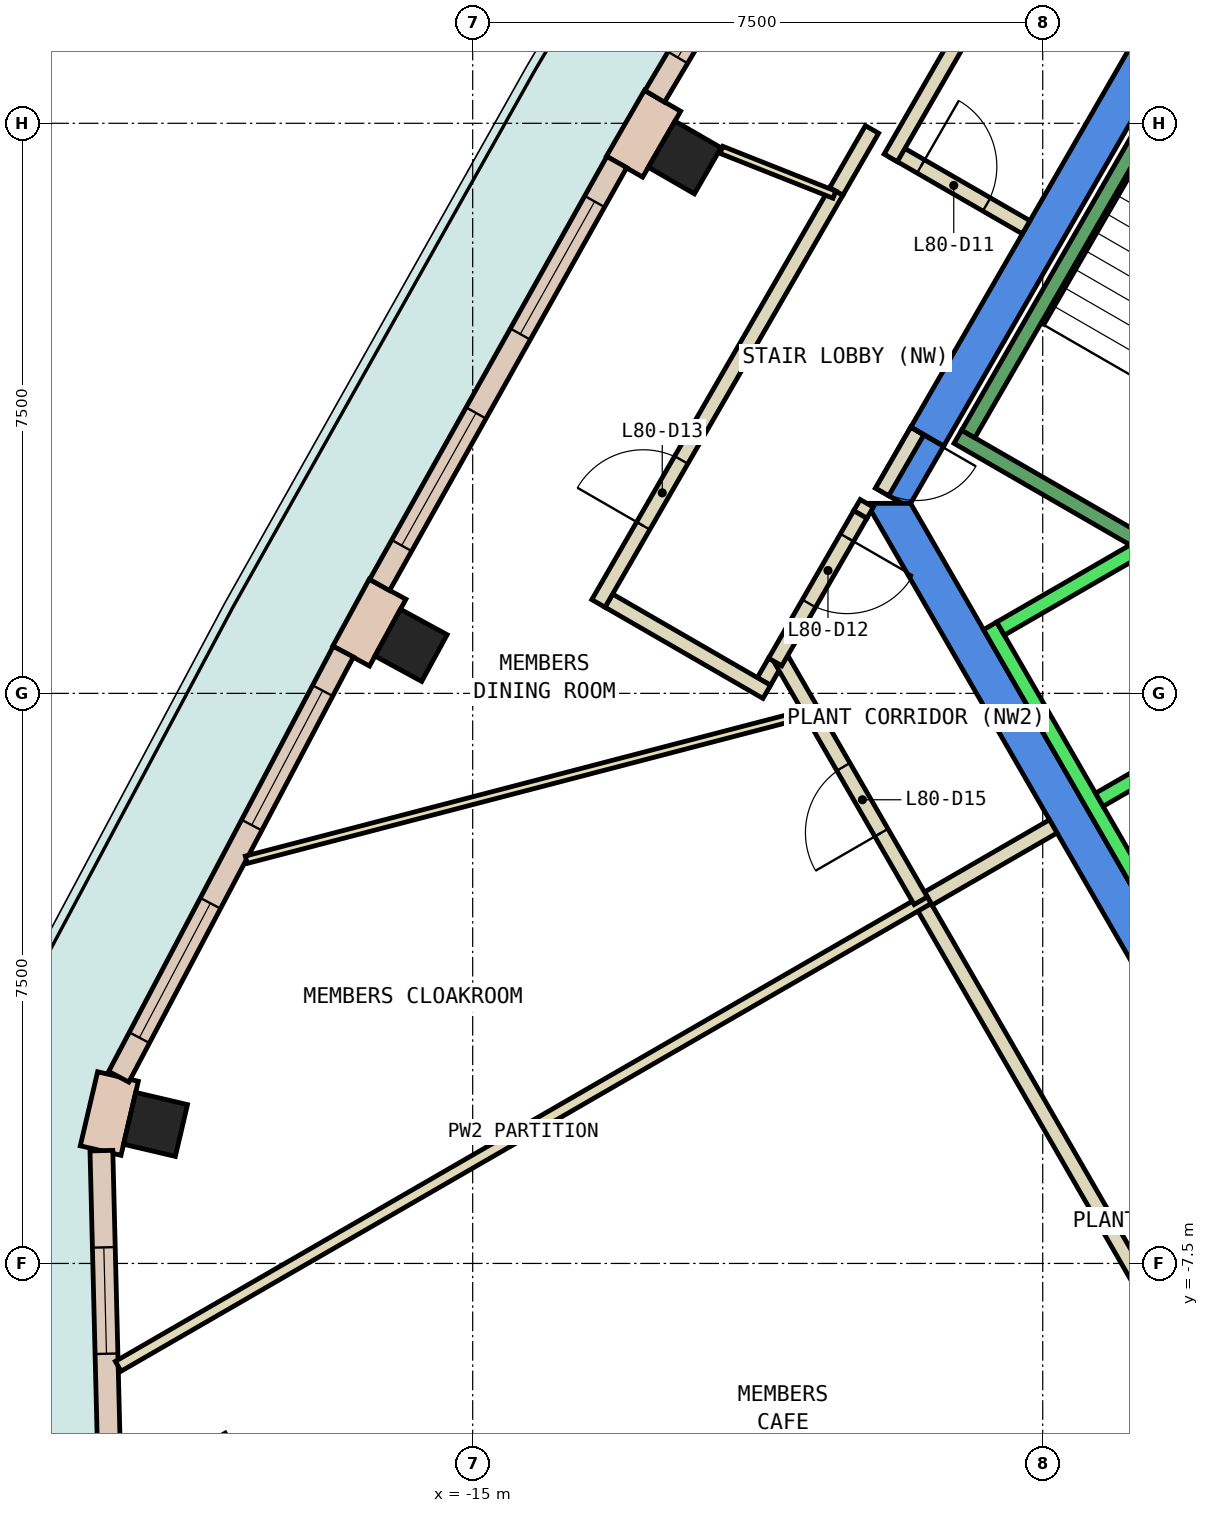
"""IFC4 building model, lengths in metres.
Left out: names, types, materials, properties, quantities, classifications, styles, units other than length and angle.
Written with IfcOpenShell. Run it as: python <this file> out.ifc"""

import sys

from ifc_helpers import new_model, si_unit, direction, frame, frame_2d, origin, origin_2d, place, context, subcontext, project, spatial, polyline, rectangle, outline, extrude, element, fill, save


model = new_model("IFC4")
c1 = context("Model", 3, precision=1e-05, world=origin(), true_north=direction((0.0, 1.0)))
c2 = subcontext(c1, "Body", "Model", "MODEL_VIEW")
j1 = project(units=[si_unit("LENGTHUNIT", "METRE"), si_unit("PLANEANGLEUNIT", "RADIAN")], contexts=[c1])
p1 = place(None, origin())
s1 = spatial("IfcSite", under=j1, at=p1, CompositionType="ELEMENT")
p2 = place(p1, origin())
s2 = spatial("IfcBuilding", under=s1, at=p2, CompositionType="ELEMENT")
p3 = place(p2, frame((0.0, 0.0, 340.4)))
s3 = spatial("IfcBuildingStorey", under=s2, at=p3, CompositionType="ELEMENT", Elevation=340.4)
for number, where, z_axis, x_axis in (
    (1, (-12.211, 7.05, 0.0), (0.0, 0.0, 1.0), (0.5, 0.866, 0.0)),
    (2, (-15.811, 0.632, 0.0), (0.0, 0.0, 1.0), (0.478, 0.878, 0.0)),
    (3, (-19.173, -5.671, 0.0), (0.0, 0.0, 1.0), (0.228, 0.974, 0.0)),
):
    element("IfcColumn", number, at=place(p3, frame(where, z_axis=z_axis, x_axis=x_axis)), inside=s3, PredefinedType="COLUMN", context=c2, shape_type="SweptSolid", body=[
        extrude(rectangle(XDim=0.7, YDim=0.7, at=origin_2d()), origin(), (0.0, 0.0, 1.0), 4.15),
    ])
p4 = place(p3, frame((-18.512, -10.688, 0.0), z_axis=(0.0, 0.0, 1.0), x_axis=(0.866025403784, 0.5, 0.0)))
e4 = element("IfcColumn", 4, at=p4, inside=s3, PredefinedType="COLUMN", context=c2, shape_type="SweptSolid", body=[
    extrude(rectangle(XDim=1.4, YDim=1.4, at=origin_2d()), origin(), (0.0, 0.0, 1.0), 4.15),
])
p5 = place(p3, frame((0.0, 0.0, -0.45)))
e5 = element("IfcWall", 5, at=p5, inside=s3, PredefinedType="SHEAR", context=c2, shape_type="SweptSolid", body=[
    extrude(outline(polyline([(-9.236, 3.502), (-8.803, 3.253), (-4.619, 10.5), (-4.907, 11.0), (-9.236, 3.502)])), origin(), (0.0, 0.0, 1.0), 4.6),
])
p6 = place(p3, frame((0.0, 0.0, 3.6)))
e6 = element("IfcWall", 6, at=p6, inside=s3, PredefinedType="SHEAR", context=c2, shape_type="SweptSolid", body=[
    extrude(outline(polyline([(-9.7, 2.7), (-9.354, 2.5), (-9.238, 2.5), (-8.803, 3.253), (-9.236, 3.502), (-9.7, 2.7)])), origin(), (0.0, 0.0, 1.0), 0.55),
])
p7 = place(p3, frame((0.0, 0.0, -0.45)))
e7 = element("IfcWall", 7, at=p7, inside=s3, PredefinedType="SHEAR", context=c2, shape_type="SweptSolid", body=[
    extrude(outline(polyline([(-9.815, 2.5), (-4.907, -6.0), (-4.619, -5.5), (-9.238, 2.5), (-9.815, 2.5)])), origin(), (0.0, 0.0, 1.0), 4.6),
])
p8 = place(p3, frame((-12.502, 7.796, 0.0), z_axis=(0.0, 0.0, 1.0), x_axis=(-0.49960277677, -0.866254619292, 0.0)))
e8 = element("IfcWall", 8, at=p8, inside=s3, PredefinedType="STANDARD", context=c2, shape_type="SweptSolid", body=[
    extrude(rectangle(XDim=1.001, YDim=0.55, at=frame_2d((0.5, 0.0))), origin(), (0.0, 0.0, 1.0), 4.15),
])
p9 = place(p3, frame((-16.12, 1.37, 0.0), z_axis=(0.0, 0.0, 1.0), x_axis=(-0.478442030542, -0.878119139645, 0.0)))
e9 = element("IfcWall", 9, at=p9, inside=s3, PredefinedType="STANDARD", context=c2, shape_type="SweptSolid", body=[
    extrude(rectangle(XDim=1.001, YDim=0.55, at=frame_2d((0.5, 0.0))), origin(), (0.0, 0.0, 1.0), 4.15),
])
p10 = place(p3, frame((-19.667, -5.041, 0.0), z_axis=(0.0, 0.0, 1.0), x_axis=(-0.227978015861, -0.97366627973, 0.0)))
e10 = element("IfcWall", 10, at=p10, inside=s3, PredefinedType="STANDARD", context=c2, shape_type="SweptSolid", body=[
    extrude(rectangle(XDim=1.0, YDim=0.55, at=frame_2d((0.5, 0.0))), origin(), (0.0, 0.0, 1.0), 4.15),
])
p11 = place(p3, frame((-9.347, 13.339, 0.0), z_axis=(0.0, 0.0, 1.0), x_axis=(-0.510686403068, -0.859767060152, 0.0)))
e11 = element("IfcWall", 11, at=p11, inside=s3, PredefinedType="STANDARD", context=c2, shape_type="SweptSolid", body=[
    extrude(rectangle(XDim=6.38, YDim=0.3, at=frame_2d((3.19, 0.0))), origin(), (0.0, 0.0, 1.0), 4.15),
])
p12 = place(p11, frame((0.595, 0.0, 0.0)))
e12 = element("IfcOpeningElement", 12, at=p12, cuts=e11, PredefinedType="OPENING", context=c2, shape_type="SweptSolid", body=[
    extrude(rectangle(XDim=2.0, YDim=2.4, at=frame_2d((1.0, 1.2))), frame((0.0, 0.16, 0.0), z_axis=(0.0, -1.0, 0.0), x_axis=(1.0, 0.0, 0.0)), (0.0, 0.0, 1.0), 0.32),
])
p13 = place(p11, frame((3.785, 0.0, 0.9)))
e13 = element("IfcOpeningElement", 13, at=p13, cuts=e11, PredefinedType="OPENING", context=c2, shape_type="SweptSolid", body=[
    extrude(rectangle(XDim=2.0, YDim=3.0, at=frame_2d((1.0, 1.5))), frame((0.0, 0.16, 0.0), z_axis=(0.0, -1.0, 0.0), x_axis=(1.0, 0.0, 0.0)), (0.0, 0.0, 1.0), 0.32),
])
p14 = place(p3, frame((-13.104, 6.99, 0.0), z_axis=(0.0, 0.0, 1.0), x_axis=(-0.489232514948, -0.872153396094, 0.0)))
e14 = element("IfcWall", 14, at=p14, inside=s3, PredefinedType="STANDARD", context=c2, shape_type="SweptSolid", body=[
    extrude(rectangle(XDim=6.38, YDim=0.3, at=frame_2d((3.19, 0.0))), origin(), (0.0, 0.0, 1.0), 4.15),
])
p15 = place(p14, frame((0.595, 0.0, 0.9)))
e15 = element("IfcOpeningElement", 15, at=p15, cuts=e14, PredefinedType="OPENING", context=c2, shape_type="SweptSolid", body=[
    extrude(rectangle(XDim=2.0, YDim=3.0, at=frame_2d((1.0, 1.5))), frame((0.0, 0.16, 0.0), z_axis=(0.0, -1.0, 0.0), x_axis=(1.0, 0.0, 0.0)), (0.0, 0.0, 1.0), 0.32),
])
p16 = place(p14, frame((3.785, 0.0, 0.9)))
e16 = element("IfcOpeningElement", 16, at=p16, cuts=e14, PredefinedType="OPENING", context=c2, shape_type="SweptSolid", body=[
    extrude(rectangle(XDim=2.0, YDim=3.0, at=frame_2d((1.0, 1.5))), frame((0.0, 0.16, 0.0), z_axis=(0.0, -1.0, 0.0), x_axis=(1.0, 0.0, 0.0)), (0.0, 0.0, 1.0), 0.32),
])
p17 = place(p3, frame((-16.702, 0.549, 0.0), z_axis=(0.0, 0.0, 1.0), x_axis=(-0.467155191513, -0.884175337274, 0.0)))
e17 = element("IfcWall", 17, at=p17, inside=s3, PredefinedType="STANDARD", context=c2, shape_type="SweptSolid", body=[
    extrude(rectangle(XDim=6.326, YDim=0.3, at=frame_2d((3.163, 0.0))), origin(), (0.0, 0.0, 1.0), 4.15),
])
p18 = place(p17, frame((0.581, 0.0, 0.9)))
e18 = element("IfcOpeningElement", 18, at=p18, cuts=e17, PredefinedType="OPENING", context=c2, shape_type="SweptSolid", body=[
    extrude(rectangle(XDim=2.0, YDim=3.0, at=frame_2d((1.0, 1.5))), frame((0.0, 0.16, 0.0), z_axis=(0.0, -1.0, 0.0), x_axis=(1.0, 0.0, 0.0)), (0.0, 0.0, 1.0), 0.32),
])
p19 = place(p17, frame((3.744, 0.0, 0.9)))
e19 = element("IfcOpeningElement", 19, at=p19, cuts=e17, PredefinedType="OPENING", context=c2, shape_type="SweptSolid", body=[
    extrude(rectangle(XDim=2.0, YDim=3.0, at=frame_2d((1.0, 1.5))), frame((0.0, 0.16, 0.0), z_axis=(0.0, -1.0, 0.0), x_axis=(1.0, 0.0, 0.0)), (0.0, 0.0, 1.0), 0.32),
])
p20 = place(p3, frame((-19.885, -6.016, 0.0), z_axis=(0.0, 0.0, 1.0), x_axis=(0.025006167975, -0.99968729689, 0.0)))
e20 = element("IfcWall", 20, at=p20, inside=s3, PredefinedType="STANDARD", context=c2, shape_type="SweptSolid", body=[
    extrude(rectangle(XDim=4.364, YDim=0.3, at=frame_2d((2.182, 0.0))), origin(), (0.0, 0.0, 1.0), 4.15),
])
p21 = place(p20, frame((1.273, 0.0, 0.9)))
e21 = element("IfcOpeningElement", 21, at=p21, cuts=e20, PredefinedType="OPENING", context=c2, shape_type="SweptSolid", body=[
    extrude(rectangle(XDim=1.4, YDim=3.0, at=frame_2d((0.7, 1.5))), frame((0.0, 0.16, 0.0), z_axis=(0.0, -1.0, 0.0), x_axis=(1.0, 0.0, 0.0)), (0.0, 0.0, 1.0), 0.32),
])
p22 = place(p3, frame((-6.112, -7.913, 0.0), z_axis=(0.0, 0.0, 1.0), x_axis=(-0.499915430684, 0.866074224396, 0.0)))
e22 = element("IfcWall", 22, at=p22, inside=s3, PredefinedType="PARTITIONING", context=c2, shape_type="SweptSolid", body=[
    extrude(rectangle(XDim=5.987, YDim=0.2, at=frame_2d((2.993, 0.0))), origin(), (0.0, 0.0, 1.0), 4.15),
])
p23 = place(p3, frame((-9.006, -2.7, 0.0), z_axis=(0.0, 0.0, 1.0), x_axis=(0.865980106173, 0.500078449558, 0.0)))
e23 = element("IfcWall", 23, at=p23, inside=s3, PredefinedType="PARTITIONING", context=c2, shape_type="SweptSolid", body=[
    extrude(rectangle(XDim=1.9, YDim=0.2, at=frame_2d((0.95, 0.0))), origin(), (0.0, 0.0, 1.0), 4.15),
])
p24 = place(p3, frame((-19.664, -8.853, 0.0), z_axis=(0.0, 0.0, 1.0), x_axis=(0.866035935173, 0.499981758657, 0.0)))
e24 = element("IfcWall", 24, at=p24, inside=s3, PredefinedType="PARTITIONING", context=c2, shape_type="SweptSolid", body=[
    extrude(rectangle(XDim=12.307, YDim=0.15, at=frame_2d((6.153, 0.0))), origin(), (0.0, 0.0, 1.0), 4.15),
])
p25 = place(p3, frame((-9.45, 7.132, 0.0), z_axis=(0.0, 0.0, 1.0), x_axis=(0.866010750942, -0.50002537861, 0.0)))
e25 = element("IfcWall", 25, at=p25, inside=s3, PredefinedType="PARTITIONING", context=c2, shape_type="SweptSolid", body=[
    extrude(rectangle(XDim=2.0, YDim=0.2, at=frame_2d((1.0, 0.0))), origin(), (0.0, 0.0, 1.0), 4.15),
])
p26 = place(p25, frame((0.4, 0.0, 0.0)))
e26 = element("IfcOpeningElement", 26, at=p26, cuts=e25, PredefinedType="OPENING", context=c2, shape_type="SweptSolid", body=[
    extrude(rectangle(XDim=1.0, YDim=2.1, at=frame_2d((0.5, 1.05))), frame((0.0, 0.11, 0.0), z_axis=(0.0, -1.0, 0.0), x_axis=(1.0, 0.0, 0.0)), (0.0, 0.0, 1.0), 0.22),
])
p27 = place(p3, frame((-9.815, 2.5, 0.0), z_axis=(0.0, 0.0, 1.0), x_axis=(-0.5004692653, -0.865754303766, 0.0)))
e27 = element("IfcWall", 27, at=p27, inside=s3, PredefinedType="PARTITIONING", context=c2, shape_type="SweptSolid", body=[
    extrude(rectangle(XDim=0.17, YDim=0.2, at=frame_2d((0.085, 0.0))), origin(), (0.0, 0.0, 1.0), 2.4),
])
p28 = place(p3, frame((-11.02, 0.413, 0.0), z_axis=(0.0, 0.0, 1.0), x_axis=(-0.500222587251, -0.865896854829, 0.0)))
e28 = element("IfcWall", 28, at=p28, inside=s3, PredefinedType="PARTITIONING", context=c2, shape_type="SweptSolid", body=[
    extrude(rectangle(XDim=0.296, YDim=0.2, at=frame_2d((0.148, 0.0))), origin(), (0.0, 0.0, 1.0), 4.15),
])
p29 = place(p3, frame((-11.131, 0.02, 0.0), z_axis=(0.0, 0.0, 1.0), x_axis=(-0.865973769406, 0.500089422704, 0.0)))
e29 = element("IfcWall", 29, at=p29, inside=s3, PredefinedType="PARTITIONING", context=c2, shape_type="SweptSolid", body=[
    extrude(rectangle(XDim=2.399, YDim=0.2, at=frame_2d((1.2, 0.0))), origin(), (0.0, 0.0, 1.0), 4.15),
])
p30 = place(p3, frame((-13.346, 1.183, 0.0), z_axis=(0.0, 0.0, 1.0), x_axis=(0.5000150537, 0.866016712352, 0.0)))
e30 = element("IfcWall", 30, at=p30, inside=s3, PredefinedType="PARTITIONING", context=c2, shape_type="SweptSolid", body=[
    extrude(rectangle(XDim=6.26, YDim=0.2, at=frame_2d((3.13, 0.0))), origin(), (0.0, 0.0, 1.0), 4.15),
])
p31 = place(p30, frame((1.18, 0.0, 0.0)))
e31 = element("IfcOpeningElement", 31, at=p31, cuts=e30, PredefinedType="OPENING", context=c2, shape_type="SweptSolid", body=[
    extrude(rectangle(XDim=1.0, YDim=2.1, at=frame_2d((0.5, 1.05))), frame((0.0, 0.11, 0.0), z_axis=(0.0, -1.0, 0.0), x_axis=(1.0, 0.0, 0.0)), (0.0, 0.0, 1.0), 0.22),
])
p32 = place(p3, frame((-10.216, 6.604, 0.0), z_axis=(0.0, 0.0, 1.0), x_axis=(0.499572668549, 0.866271983178, 0.0)))
e32 = element("IfcWall", 32, at=p32, inside=s3, PredefinedType="PARTITIONING", context=c2, shape_type="SweptSolid", body=[
    extrude(rectangle(XDim=0.941, YDim=0.2, at=frame_2d((0.47, 0.0))), origin(), (0.0, 0.0, 1.0), 4.15),
])
p33 = place(p3, frame((-9.5, 7.045, 0.0), z_axis=(0.0, 0.0, 1.0), x_axis=(0.499966812698, 0.866044563634, 0.0)))
e33 = element("IfcWall", 33, at=p33, inside=s3, PredefinedType="PARTITIONING", context=c2, shape_type="SweptSolid", body=[
    extrude(rectangle(XDim=6.977, YDim=0.2, at=frame_2d((3.488, 0.0))), origin(), (0.0, 0.0, 1.0), 4.15),
])
p34 = place(p33, frame((5.826, 0.0, 0.0)))
e34 = element("IfcOpeningElement", 34, at=p34, cuts=e33, PredefinedType="OPENING", context=c2, shape_type="SweptSolid", body=[
    extrude(rectangle(XDim=1.0, YDim=2.1, at=frame_2d((0.5, 1.05))), frame((0.0, 0.11, 0.0), z_axis=(0.0, -1.0, 0.0), x_axis=(1.0, 0.0, 0.0)), (0.0, 0.0, 1.0), 0.22),
])
p35 = place(p3, frame((-10.563, -0.205, 0.0), z_axis=(0.0, 0.0, 1.0), x_axis=(-0.499912825186, 0.866075728337, 0.0)))
e35 = element("IfcWall", 35, at=p35, inside=s3, PredefinedType="PARTITIONING", context=c2, shape_type="SweptSolid", body=[
    extrude(rectangle(XDim=0.814, YDim=0.2, at=frame_2d((0.407, 0.0))), origin(), (0.0, 0.0, 1.0), 4.15),
])
p36 = place(p3, frame((-9.105, -2.728, 0.0), z_axis=(0.0, 0.0, 1.0), x_axis=(-0.500253029287, 0.865879267963, 0.0)))
e36 = element("IfcWall", 36, at=p36, inside=s3, PredefinedType="PARTITIONING", context=c2, shape_type="SweptSolid", body=[
    extrude(rectangle(XDim=2.814, YDim=0.2, at=frame_2d((1.407, 0.0))), origin(), (0.0, 0.0, 1.0), 4.15),
])
p37 = place(p36, frame((1.034, 0.0, 0.0)))
e37 = element("IfcOpeningElement", 37, at=p37, cuts=e36, PredefinedType="OPENING", context=c2, shape_type="SweptSolid", body=[
    extrude(rectangle(XDim=1.0, YDim=2.1, at=frame_2d((0.5, 1.05))), frame((0.0, 0.11, 0.0), z_axis=(0.0, -1.0, 0.0), x_axis=(1.0, 0.0, 0.0)), (0.0, 0.0, 1.0), 0.22),
])
p38 = place(p3, frame((-11.726, 7.15, 0.0), z_axis=(0.0, 0.0, 1.0), x_axis=(0.929589639936, -0.36859612223, 0.0)))
e38 = element("IfcWall", 38, at=p38, inside=s3, PredefinedType="PARTITIONING", context=c2, shape_type="SweptSolid", body=[
    extrude(rectangle(XDim=1.598, YDim=0.1, at=frame_2d((0.799, 0.0))), origin(), (0.0, 0.0, 1.0), 4.15),
])
p39 = place(p3, frame((-10.441, -0.223, 0.0), z_axis=(0.0, 0.0, 1.0), x_axis=(-0.967629585061, -0.252374693888, 0.0)))
e39 = element("IfcWall", 39, at=p39, inside=s3, PredefinedType="PARTITIONING", context=c2, shape_type="SweptSolid", body=[
    extrude(rectangle(XDim=7.79, YDim=0.1, at=frame_2d((3.895, 0.0))), origin(), (0.0, 0.0, 1.0), 4.15),
])
p40 = place(p3, frame((-9.15, 3.452, 0.0), z_axis=(0.0, 0.0, 1.0), x_axis=(-0.500079945886, -0.865979242085, 0.0)))
e40 = element("IfcWall", 40, at=p40, inside=s3, PredefinedType="PARTITIONING", context=c2, shape_type="SweptSolid", body=[
    extrude(rectangle(XDim=0.926, YDim=0.2, at=frame_2d((0.463, 0.0))), origin(), (0.0, 0.0, 1.0), 2.4),
])
p41 = place(p40, frame((0.017, 0.0, 0.0)))
e41 = element("IfcOpeningElement", 41, at=p41, cuts=e40, PredefinedType="OPENING", context=c2, shape_type="SweptSolid", body=[
    extrude(rectangle(XDim=0.9, YDim=2.1, at=frame_2d((0.45, 1.05))), frame((0.0, 0.11, 0.0), z_axis=(0.0, -1.0, 0.0), x_axis=(1.0, 0.0, 0.0)), (0.0, 0.0, 1.0), 0.22),
])
p42 = place(p3, frame((-9.9, 2.353, 0.0), z_axis=(0.0, 0.0, 1.0), x_axis=(-0.500030632641, -0.866007717299, 0.0)))
e42 = element("IfcWall", 42, at=p42, inside=s3, PredefinedType="PARTITIONING", context=c2, shape_type="SweptSolid", body=[
    extrude(rectangle(XDim=2.24, YDim=0.2, at=frame_2d((1.12, 0.0))), origin(), (0.0, 0.0, 1.0), 4.15),
])
p43 = place(p42, frame((0.351, 0.0, 0.0)))
e43 = element("IfcOpeningElement", 43, at=p43, cuts=e42, PredefinedType="OPENING", context=c2, shape_type="SweptSolid", body=[
    extrude(rectangle(XDim=1.0, YDim=2.1, at=frame_2d((0.5, 1.05))), frame((0.0, 0.11, 0.0), z_axis=(0.0, -1.0, 0.0), x_axis=(1.0, 0.0, 0.0)), (0.0, 0.0, 1.0), 0.22),
])
p44 = place(p3, frame((-8.192, 0.888, 0.0), z_axis=(0.0, 0.0, 1.0), x_axis=(0.500034260056, -0.866005622828, 0.0)))
e44 = element("IfcWall", 44, at=p44, inside=s3, PredefinedType="STANDARD", context=c2, shape_type="SweptSolid", body=[
    extrude(rectangle(XDim=5.399, YDim=0.2, at=frame_2d((2.7, 0.0))), origin(), (0.0, 0.0, 1.0), 4.15),
])
for number, where, z_axis, x_axis in (
    (45, (-5.977, 2.052, 0.0), (0.0, 0.0, 1.0), (-0.866, -0.5, 0.0)),
    (46, (-4.677, -0.2, 0.0), (0.0, 0.0, 1.0), (-0.866, -0.5, 0.0)),
):
    element("IfcWall", number, at=place(p3, frame(where, z_axis=z_axis, x_axis=x_axis)), inside=s3, PredefinedType="STANDARD", context=c2, shape_type="SweptSolid", body=[
        extrude(rectangle(XDim=2.399, YDim=0.2, at=frame_2d((1.2, 0.0))), origin(), (0.0, 0.0, 1.0), 4.15),
    ])
p45 = place(p3, frame((-6.25, 2.01, 0.0), z_axis=(0.0, 0.0, 1.0), x_axis=(-0.86611865017, 0.499838457731, 0.0)))
e47 = element("IfcWall", 47, at=p45, inside=s3, PredefinedType="STANDARD", context=c2, shape_type="SweptSolid", body=[
    extrude(rectangle(XDim=2.733, YDim=0.2, at=frame_2d((1.366, 0.0))), origin(), (0.0, 0.0, 1.0), 4.15),
])
p46 = place(p3, frame((-5.03, 9.388, 0.0), z_axis=(0.0, 0.0, 1.0), x_axis=(-0.499978703459, -0.866037698999, 0.0)))
e48 = element("IfcWall", 48, at=p46, inside=s3, PredefinedType="STANDARD", context=c2, shape_type="SweptSolid", body=[
    extrude(rectangle(XDim=6.9, YDim=0.2, at=frame_2d((3.45, 0.0))), origin(), (0.0, 0.0, 1.0), 4.15),
])
p47 = place(p13, origin())
e49 = element("IfcWindow", 49, at=p47, inside=s3, PartitioningType="SINGLE_PANEL", PredefinedType="WINDOW", context=c2, shape_type="SweptSolid", body=[
    extrude(rectangle(XDim=2.0, YDim=3.0, at=frame_2d((1.0, 1.5))), frame((0.0, 0.03, 0.0), z_axis=(0.0, -1.0, 0.0), x_axis=(1.0, 0.0, 0.0)), (0.0, 0.0, 1.0), 0.06),
])
fill(e13, e49)
p48 = place(p15, origin())
e50 = element("IfcWindow", 50, at=p48, inside=s3, PartitioningType="SINGLE_PANEL", PredefinedType="WINDOW", context=c2, shape_type="SweptSolid", body=[
    extrude(rectangle(XDim=2.0, YDim=3.0, at=frame_2d((1.0, 1.5))), frame((0.0, 0.03, 0.0), z_axis=(0.0, -1.0, 0.0), x_axis=(1.0, 0.0, 0.0)), (0.0, 0.0, 1.0), 0.06),
])
fill(e15, e50)
p49 = place(p16, origin())
e51 = element("IfcWindow", 51, at=p49, inside=s3, PartitioningType="SINGLE_PANEL", PredefinedType="WINDOW", context=c2, shape_type="SweptSolid", body=[
    extrude(rectangle(XDim=2.0, YDim=3.0, at=frame_2d((1.0, 1.5))), frame((0.0, 0.03, 0.0), z_axis=(0.0, -1.0, 0.0), x_axis=(1.0, 0.0, 0.0)), (0.0, 0.0, 1.0), 0.06),
])
fill(e16, e51)
p50 = place(p18, origin())
e52 = element("IfcWindow", 52, at=p50, inside=s3, PartitioningType="SINGLE_PANEL", PredefinedType="WINDOW", context=c2, shape_type="SweptSolid", body=[
    extrude(rectangle(XDim=2.0, YDim=3.0, at=frame_2d((1.0, 1.5))), frame((0.0, 0.03, 0.0), z_axis=(0.0, -1.0, 0.0), x_axis=(1.0, 0.0, 0.0)), (0.0, 0.0, 1.0), 0.06),
])
fill(e18, e52)
p51 = place(p19, origin())
e53 = element("IfcWindow", 53, at=p51, inside=s3, PartitioningType="SINGLE_PANEL", PredefinedType="WINDOW", context=c2, shape_type="SweptSolid", body=[
    extrude(rectangle(XDim=2.0, YDim=3.0, at=frame_2d((1.0, 1.5))), frame((0.0, 0.03, 0.0), z_axis=(0.0, -1.0, 0.0), x_axis=(1.0, 0.0, 0.0)), (0.0, 0.0, 1.0), 0.06),
])
fill(e19, e53)
p52 = place(p21, origin())
e54 = element("IfcWindow", 54, at=p52, inside=s3, PartitioningType="SINGLE_PANEL", PredefinedType="WINDOW", context=c2, shape_type="SweptSolid", body=[
    extrude(rectangle(XDim=1.4, YDim=3.0, at=frame_2d((0.7, 1.5))), frame((0.0, 0.03, 0.0), z_axis=(0.0, -1.0, 0.0), x_axis=(1.0, 0.0, 0.0)), (0.0, 0.0, 1.0), 0.06),
])
fill(e21, e54)
p53 = place(p26, origin())
e55 = element("IfcDoor", 55, at=p53, inside=s3, OperationType="SINGLE_SWING_LEFT", PredefinedType="DOOR", context=c2, shape_type="SweptSolid", body=[
    extrude(rectangle(XDim=1.0, YDim=2.1, at=frame_2d((0.5, 1.05))), frame((0.0, 0.025, 0.0), z_axis=(0.0, -1.0, 0.0), x_axis=(1.0, 0.0, 0.0)), (0.0, 0.0, 1.0), 0.05),
])
fill(e26, e55)
p54 = place(p43, origin())
e56 = element("IfcDoor", 56, at=p54, inside=s3, OperationType="SINGLE_SWING_RIGHT", PredefinedType="DOOR", context=c2, shape_type="SweptSolid", body=[
    extrude(rectangle(XDim=1.0, YDim=2.1, at=frame_2d((0.5, 1.05))), frame((0.0, 0.025, 0.0), z_axis=(0.0, -1.0, 0.0), x_axis=(1.0, 0.0, 0.0)), (0.0, 0.0, 1.0), 0.05),
])
fill(e43, e56)
p55 = place(p31, origin())
e57 = element("IfcDoor", 57, at=p55, inside=s3, OperationType="SINGLE_SWING_LEFT", PredefinedType="DOOR", context=c2, shape_type="SweptSolid", body=[
    extrude(rectangle(XDim=1.0, YDim=2.1, at=frame_2d((0.5, 1.05))), frame((0.0, 0.025, 0.0), z_axis=(0.0, -1.0, 0.0), x_axis=(1.0, 0.0, 0.0)), (0.0, 0.0, 1.0), 0.05),
])
fill(e31, e57)
p56 = place(p37, origin())
e58 = element("IfcDoor", 58, at=p56, inside=s3, OperationType="SINGLE_SWING_LEFT", PredefinedType="DOOR", context=c2, shape_type="SweptSolid", body=[
    extrude(rectangle(XDim=1.0, YDim=2.1, at=frame_2d((0.5, 1.05))), frame((0.0, 0.025, 0.0), z_axis=(0.0, -1.0, 0.0), x_axis=(1.0, 0.0, 0.0)), (0.0, 0.0, 1.0), 0.05),
])
fill(e37, e58)
p57 = place(p41, origin())
e59 = element("IfcDoor", 59, at=p57, inside=s3, OperationType="SINGLE_SWING_LEFT", PredefinedType="DOOR", context=c2, shape_type="SweptSolid", body=[
    extrude(rectangle(XDim=0.9, YDim=2.1, at=frame_2d((0.45, 1.05))), frame((0.0, 0.025, 0.0), z_axis=(0.0, -1.0, 0.0), x_axis=(1.0, 0.0, 0.0)), (0.0, 0.0, 1.0), 0.05),
])
fill(e41, e59)
save(model, sys.argv[1])
